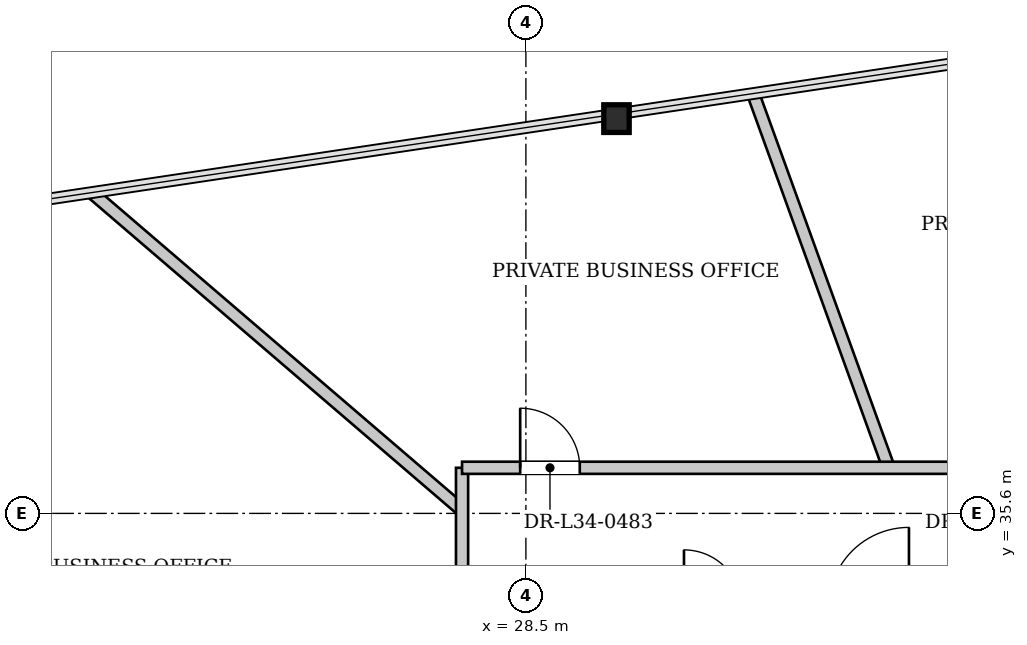
"""IFC4 building model, lengths in metres.
Left out: names, types, materials, properties, quantities, classifications, styles, units other than length and angle.
Written with IfcOpenShell. Run it as: python <this file> out.ifc"""

import sys

from ifc_helpers import new_model, si_unit, direction, frame, frame_2d, origin, origin_2d, place, context, subcontext, project, spatial, rectangle, i_section, extrude, source, transform, mapped, element, fill, save


model = new_model("IFC4")
c1 = context("Model", 3, precision=1e-05, world=origin(), true_north=direction((0.0, 1.0)))
c2 = subcontext(c1, "Body", "Model", "MODEL_VIEW")
j1 = project(units=[si_unit("LENGTHUNIT", "METRE"), si_unit("PLANEANGLEUNIT", "RADIAN")], contexts=[c1])
p1 = place(None, origin())
s1 = spatial("IfcSite", under=j1, at=p1, CompositionType="ELEMENT")
p2 = place(p1, origin())
s2 = spatial("IfcBuilding", under=s1, at=p2, CompositionType="ELEMENT")
p3 = place(p2, frame((0.0, 0.0, 130.55)))
s3 = spatial("IfcBuildingStorey", under=s2, at=p3, CompositionType="ELEMENT", Elevation=130.55)
m1 = source(origin(), c2, "Body", "SweptSolid", [
    extrude(i_section(OverallWidth=0.418, OverallDepth=0.455, WebThickness=0.038, FlangeThickness=0.059, at=origin_2d()), origin(), (0.0, 0.0, 1.0), 3.399),
])
p4 = place(p3, frame((30.11, 42.186, 0.0), z_axis=(-0.07068503957, -0.054953308203, 0.995983814677), x_axis=(0.613773964369, -0.78948180515, 0.0)))
e1 = element("IfcColumn", 1, at=p4, inside=s3, PredefinedType="COLUMN", context=c2, shape_type="MappedRepresentation", body=[
    mapped(m1, transform((0.0, 0.0, 0.0), x_axis=(1.0, 0.0, 0.0), y_axis=(0.0, 1.0, 0.0), z_axis=(0.0, 0.0, 1.0), scale=1.0)),
])
p5 = place(p3, frame((34.467, 36.35, 0.0), z_axis=(0.0, 0.0, 1.0), x_axis=(-0.340674701082, 0.940181231488, 0.0)))
e2 = element("IfcWall", 2, at=p5, inside=s3, PredefinedType="PARTITIONING", context=c2, shape_type="SweptSolid", body=[
    extrude(rectangle(XDim=6.515, YDim=0.2, at=frame_2d((3.257, 0.0))), origin(), (0.0, 0.0, 1.0), 3.3),
])
p6 = place(p3, frame((27.45, 35.651, 0.0), z_axis=(0.0, 0.0, 1.0), x_axis=(-0.75895865216, 0.651138821075, 0.0)))
e3 = element("IfcWall", 3, at=p6, inside=s3, PredefinedType="PARTITIONING", context=c2, shape_type="SweptSolid", body=[
    extrude(rectangle(XDim=7.984, YDim=0.2, at=frame_2d((3.992, 0.0))), origin(), (0.0, 0.0, 1.0), 3.3),
])
p7 = place(p3, frame((27.45, 16.85, 0.0), z_axis=(0.0, 0.0, 1.0), x_axis=(0.0, 1.0, 0.0)))
e4 = element("IfcWall", 4, at=p7, inside=s3, PredefinedType="PARTITIONING", context=c2, shape_type="SweptSolid", body=[
    extrude(rectangle(XDim=19.5, YDim=0.2, at=frame_2d((9.75, 0.0))), origin(), (0.0, 0.0, 1.0), 3.3),
])
p8 = place(p7, frame((15.887, 0.0, 0.0)))
e5 = element("IfcOpeningElement", 5, at=p8, cuts=e4, PredefinedType="OPENING", context=c2, shape_type="SweptSolid", body=[
    extrude(rectangle(XDim=0.98, YDim=2.15, at=frame_2d((0.49, 1.075))), frame((0.0, 0.11, 0.0), z_axis=(0.0, -1.0, 0.0), x_axis=(1.0, 0.0, 0.0)), (0.0, 0.0, 1.0), 0.22),
])
p9 = place(p7, frame((8.553, 0.0, 0.0)))
e6 = element("IfcOpeningElement", 6, at=p9, cuts=e4, PredefinedType="OPENING", context=c2, shape_type="SweptSolid", body=[
    extrude(rectangle(XDim=0.98, YDim=2.15, at=frame_2d((0.49, 1.075))), frame((0.0, 0.11, 0.0), z_axis=(0.0, -1.0, 0.0), x_axis=(1.0, 0.0, 0.0)), (0.0, 0.0, 1.0), 0.22),
])
p10 = place(p7, frame((0.357, 0.0, 0.0)))
e7 = element("IfcOpeningElement", 7, at=p10, cuts=e4, PredefinedType="OPENING", context=c2, shape_type="SweptSolid", body=[
    extrude(rectangle(XDim=0.98, YDim=2.15, at=frame_2d((0.49, 1.075))), frame((0.0, 0.11, 0.0), z_axis=(0.0, -1.0, 0.0), x_axis=(1.0, 0.0, 0.0)), (0.0, 0.0, 1.0), 0.22),
])
p11 = place(p3, frame((27.45, 36.35, 0.0), z_axis=(0.0, 0.0, 1.0), x_axis=(1.0, 0.0, 0.0)))
e8 = element("IfcWall", 8, at=p11, inside=s3, PredefinedType="PARTITIONING", context=c2, shape_type="SweptSolid", body=[
    extrude(rectangle(XDim=21.1, YDim=0.2, at=frame_2d((10.55, 0.0))), origin(), (0.0, 0.0, 1.0), 3.3),
])
p12 = place(p11, frame((19.82, 0.0, 0.0)))
e9 = element("IfcOpeningElement", 9, at=p12, cuts=e8, PredefinedType="OPENING", context=c2, shape_type="SweptSolid", body=[
    extrude(rectangle(XDim=0.98, YDim=2.15, at=frame_2d((0.49, 1.075))), frame((0.0, 0.11, 0.0), z_axis=(0.0, -1.0, 0.0), x_axis=(1.0, 0.0, 0.0)), (0.0, 0.0, 1.0), 0.22),
])
p13 = place(p11, frame((16.269, 0.0, 0.0)))
e10 = element("IfcOpeningElement", 10, at=p13, cuts=e8, PredefinedType="OPENING", context=c2, shape_type="SweptSolid", body=[
    extrude(rectangle(XDim=0.98, YDim=2.15, at=frame_2d((0.49, 1.075))), frame((0.0, 0.11, 0.0), z_axis=(0.0, -1.0, 0.0), x_axis=(1.0, 0.0, 0.0)), (0.0, 0.0, 1.0), 0.22),
])
p14 = place(p11, frame((8.824, 0.0, 0.0)))
e11 = element("IfcOpeningElement", 11, at=p14, cuts=e8, PredefinedType="OPENING", context=c2, shape_type="SweptSolid", body=[
    extrude(rectangle(XDim=0.98, YDim=2.15, at=frame_2d((0.49, 1.075))), frame((0.0, 0.11, 0.0), z_axis=(0.0, -1.0, 0.0), x_axis=(1.0, 0.0, 0.0)), (0.0, 0.0, 1.0), 0.22),
])
p15 = place(p11, frame((0.956, 0.0, 0.0)))
e12 = element("IfcOpeningElement", 12, at=p15, cuts=e8, PredefinedType="OPENING", context=c2, shape_type="SweptSolid", body=[
    extrude(rectangle(XDim=0.98, YDim=2.15, at=frame_2d((0.49, 1.075))), frame((0.0, 0.11, 0.0), z_axis=(0.0, -1.0, 0.0), x_axis=(1.0, 0.0, 0.0)), (0.0, 0.0, 1.0), 0.22),
])
m2 = source(origin(), c2, "Body", "SweptSolid", [
    extrude(rectangle(XDim=0.98, YDim=2.15, at=frame_2d((0.49, 1.075))), frame((0.0, 0.025, 0.0), z_axis=(0.0, -1.0, 0.0), x_axis=(1.0, 0.0, 0.0)), (0.0, 0.0, 1.0), 0.05),
])
p16 = place(p15, origin())
e13 = element("IfcDoor", 13, at=p16, inside=s3, OperationType="SINGLE_SWING_LEFT", PredefinedType="DOOR", context=c2, shape_type="MappedRepresentation", body=[
    mapped(m2, transform((0.0, 0.0, 0.0), x_axis=(1.0, 0.0, 0.0), y_axis=(0.0, 1.0, 0.0), z_axis=(0.0, 0.0, 1.0), scale=1.0)),
])
fill(e12, e13)
save(model, sys.argv[1])
